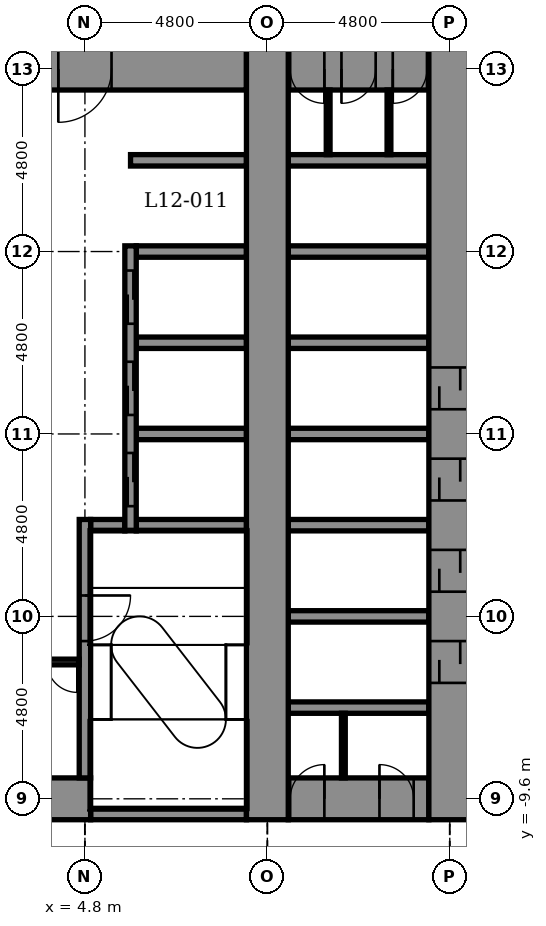
"""IFC4 building model, lengths in metres.
Left out: names, types, materials, properties, quantities, classifications, styles, units other than length and angle.
Written with IfcOpenShell. Run it as: python <this file> out.ifc"""

import sys

from ifc_helpers import new_model, si_unit, direction, frame, frame_2d, origin, place, context, subcontext, project, spatial, rectangle, extrude, element, fill, save


model = new_model("IFC4")
c1 = context("Model", 3, precision=1e-05, world=origin(), true_north=direction((0.0, 1.0)))
c2 = subcontext(c1, "Body", "Model", "MODEL_VIEW")
j1 = project(units=[si_unit("LENGTHUNIT", "METRE"), si_unit("PLANEANGLEUNIT", "RADIAN")], contexts=[c1])
p1 = place(None, origin())
s1 = spatial("IfcSite", under=j1, at=p1, CompositionType="ELEMENT")
p2 = place(p1, origin())
s2 = spatial("IfcBuilding", under=s1, at=p2, CompositionType="ELEMENT")
p3 = place(p2, frame((0.0, 0.0, 66.4)))
s3 = spatial("IfcBuildingStorey", under=s2, at=p3, CompositionType="ELEMENT", Elevation=66.4)
p4 = place(p3, frame((4.95, -10.0, -0.3), z_axis=(0.0, 0.0, 1.0), x_axis=(1.0, 0.0, 0.0)))
e1 = element("IfcWall", 1, at=p4, inside=s3, PredefinedType="STANDARD", context=c2, shape_type="SweptSolid", body=[
    extrude(rectangle(XDim=4.1, YDim=0.3, at=frame_2d((2.05, 0.0))), origin(), (0.0, 0.0, 1.0), 5.5),
])
p5 = place(p3, frame((-5.25, -9.6, -0.3), z_axis=(0.0, 0.0, 1.0), x_axis=(1.0, 0.0, 0.0)))
e2 = element("IfcWall", 2, at=p5, inside=s3, PredefinedType="SHEAR", context=c2, shape_type="SweptSolid", body=[
    extrude(rectangle(XDim=10.2, YDim=1.1, at=frame_2d((5.1, 0.0))), origin(), (0.0, 0.0, 1.0), 5.5),
])
p6 = place(p5, frame((0.6, 0.0, 0.3)))
e3 = element("IfcOpeningElement", 3, at=p6, cuts=e2, PredefinedType="OPENING", context=c2, shape_type="SweptSolid", body=[
    extrude(rectangle(XDim=0.9, YDim=2.1, at=frame_2d((0.45, 1.05))), frame((0.0, 0.56, 0.0), z_axis=(0.0, -1.0, 0.0), x_axis=(1.0, 0.0, 0.0)), (0.0, 0.0, 1.0), 1.12),
])
p7 = place(p3, frame((10.15, -9.6, -0.3), z_axis=(0.0, 0.0, 1.0), x_axis=(1.0, 0.0, 0.0)))
e4 = element("IfcWall", 4, at=p7, inside=s3, PredefinedType="SHEAR", context=c2, shape_type="SweptSolid", body=[
    extrude(rectangle(XDim=3.7, YDim=1.1, at=frame_2d((1.85, 0.0))), origin(), (0.0, 0.0, 1.0), 5.5),
])
p8 = place(p7, frame((0.05, 0.0, 0.3)))
e5 = element("IfcOpeningElement", 5, at=p8, cuts=e4, PredefinedType="OPENING", context=c2, shape_type="SweptSolid", body=[
    extrude(rectangle(XDim=0.9, YDim=2.1, at=frame_2d((0.45, 1.05))), frame((0.0, 0.56, 0.0), z_axis=(0.0, -1.0, 0.0), x_axis=(1.0, 0.0, 0.0)), (0.0, 0.0, 1.0), 1.12),
])
p9 = place(p7, frame((2.4, 0.0, 0.3)))
e6 = element("IfcOpeningElement", 6, at=p9, cuts=e4, PredefinedType="OPENING", context=c2, shape_type="SweptSolid", body=[
    extrude(rectangle(XDim=0.9, YDim=2.1, at=frame_2d((0.45, 1.05))), frame((0.0, 0.56, 0.0), z_axis=(0.0, -1.0, 0.0), x_axis=(1.0, 0.0, 0.0)), (0.0, 0.0, 1.0), 1.12),
])
for number, where, z_axis, x_axis in (
    (7, (10.15, -7.2, -0.3), (0.0, 0.0, 1.0), (1.0, 0.0, 0.0)),
    (8, (10.15, -4.8, -0.3), (0.0, 0.0, 1.0), (1.0, 0.0, 0.0)),
):
    element("IfcWall", number, at=place(p3, frame(where, z_axis=z_axis, x_axis=x_axis)), inside=s3, PredefinedType="STANDARD", context=c2, shape_type="SweptSolid", body=[
        extrude(rectangle(XDim=3.7, YDim=0.3, at=frame_2d((1.85, 0.0))), origin(), (0.0, 0.0, 1.0), 5.5),
    ])
p10 = place(p3, frame((4.95, -2.4, -0.3), z_axis=(0.0, 0.0, 1.0), x_axis=(1.0, 0.0, 0.0)))
e9 = element("IfcWall", 9, at=p10, inside=s3, PredefinedType="STANDARD", context=c2, shape_type="SweptSolid", body=[
    extrude(rectangle(XDim=0.9, YDim=0.3, at=frame_2d((0.45, 0.0))), origin(), (0.0, 0.0, 1.0), 5.5),
])
p11 = place(p3, frame((6.15, -2.4, -0.3), z_axis=(0.0, 0.0, 1.0), x_axis=(1.0, 0.0, 0.0)))
e10 = element("IfcWall", 10, at=p11, inside=s3, PredefinedType="STANDARD", context=c2, shape_type="SweptSolid", body=[
    extrude(rectangle(XDim=2.9, YDim=0.3, at=frame_2d((1.45, 0.0))), origin(), (0.0, 0.0, 1.0), 5.5),
])
p12 = place(p3, frame((10.15, -2.4, -0.3), z_axis=(0.0, 0.0, 1.0), x_axis=(1.0, 0.0, 0.0)))
e11 = element("IfcWall", 11, at=p12, inside=s3, PredefinedType="STANDARD", context=c2, shape_type="SweptSolid", body=[
    extrude(rectangle(XDim=3.7, YDim=0.3, at=frame_2d((1.85, 0.0))), origin(), (0.0, 0.0, 1.0), 5.5),
])
p13 = place(p3, frame((6.15, 0.0, -0.3), z_axis=(0.0, 0.0, 1.0), x_axis=(1.0, 0.0, 0.0)))
e12 = element("IfcWall", 12, at=p13, inside=s3, PredefinedType="STANDARD", context=c2, shape_type="SweptSolid", body=[
    extrude(rectangle(XDim=2.9, YDim=0.3, at=frame_2d((1.45, 0.0))), origin(), (0.0, 0.0, 1.0), 5.5),
])
p14 = place(p3, frame((10.15, 0.0, -0.3), z_axis=(0.0, 0.0, 1.0), x_axis=(1.0, 0.0, 0.0)))
e13 = element("IfcWall", 13, at=p14, inside=s3, PredefinedType="STANDARD", context=c2, shape_type="SweptSolid", body=[
    extrude(rectangle(XDim=3.7, YDim=0.3, at=frame_2d((1.85, 0.0))), origin(), (0.0, 0.0, 1.0), 5.5),
])
p15 = place(p3, frame((6.15, 2.4, -0.3), z_axis=(0.0, 0.0, 1.0), x_axis=(1.0, 0.0, 0.0)))
e14 = element("IfcWall", 14, at=p15, inside=s3, PredefinedType="STANDARD", context=c2, shape_type="SweptSolid", body=[
    extrude(rectangle(XDim=2.9, YDim=0.3, at=frame_2d((1.45, 0.0))), origin(), (0.0, 0.0, 1.0), 5.5),
])
p16 = place(p3, frame((10.15, 2.4, -0.3), z_axis=(0.0, 0.0, 1.0), x_axis=(1.0, 0.0, 0.0)))
e15 = element("IfcWall", 15, at=p16, inside=s3, PredefinedType="STANDARD", context=c2, shape_type="SweptSolid", body=[
    extrude(rectangle(XDim=3.7, YDim=0.3, at=frame_2d((1.85, 0.0))), origin(), (0.0, 0.0, 1.0), 5.5),
])
p17 = place(p3, frame((6.15, 4.8, -0.3), z_axis=(0.0, 0.0, 1.0), x_axis=(1.0, 0.0, 0.0)))
e16 = element("IfcWall", 16, at=p17, inside=s3, PredefinedType="STANDARD", context=c2, shape_type="SweptSolid", body=[
    extrude(rectangle(XDim=2.9, YDim=0.3, at=frame_2d((1.45, 0.0))), origin(), (0.0, 0.0, 1.0), 5.5),
])
p18 = place(p3, frame((10.15, 4.8, -0.3), z_axis=(0.0, 0.0, 1.0), x_axis=(1.0, 0.0, 0.0)))
e17 = element("IfcWall", 17, at=p18, inside=s3, PredefinedType="STANDARD", context=c2, shape_type="SweptSolid", body=[
    extrude(rectangle(XDim=3.7, YDim=0.3, at=frame_2d((1.85, 0.0))), origin(), (0.0, 0.0, 1.0), 5.5),
])
p19 = place(p3, frame((6.0, 7.2, -0.3), z_axis=(0.0, 0.0, 1.0), x_axis=(1.0, 0.0, 0.0)))
e18 = element("IfcWall", 18, at=p19, inside=s3, PredefinedType="STANDARD", context=c2, shape_type="SweptSolid", body=[
    extrude(rectangle(XDim=3.05, YDim=0.3, at=frame_2d((1.525, 0.0))), origin(), (0.0, 0.0, 1.0), 5.5),
])
p20 = place(p3, frame((10.15, 7.2, -0.3), z_axis=(0.0, 0.0, 1.0), x_axis=(1.0, 0.0, 0.0)))
e19 = element("IfcWall", 19, at=p20, inside=s3, PredefinedType="STANDARD", context=c2, shape_type="SweptSolid", body=[
    extrude(rectangle(XDim=3.7, YDim=0.3, at=frame_2d((1.85, 0.0))), origin(), (0.0, 0.0, 1.0), 5.5),
])
p21 = place(p3, frame((-5.25, 9.6, -0.3), z_axis=(0.0, 0.0, 1.0), x_axis=(1.0, 0.0, 0.0)))
e20 = element("IfcWall", 20, at=p21, inside=s3, PredefinedType="SHEAR", context=c2, shape_type="SweptSolid", body=[
    extrude(rectangle(XDim=14.3, YDim=1.1, at=frame_2d((7.15, 0.0))), origin(), (0.0, 0.0, 1.0), 5.5),
])
p22 = place(p21, frame((9.35, 0.0, 0.3)))
e21 = element("IfcOpeningElement", 21, at=p22, cuts=e20, PredefinedType="OPENING", context=c2, shape_type="SweptSolid", body=[
    extrude(rectangle(XDim=1.4, YDim=2.1, at=frame_2d((0.7, 1.05))), frame((0.0, 0.56, 0.0), z_axis=(0.0, -1.0, 0.0), x_axis=(1.0, 0.0, 0.0)), (0.0, 0.0, 1.0), 1.12),
])
p23 = place(p3, frame((10.15, 9.6, -0.3), z_axis=(0.0, 0.0, 1.0), x_axis=(1.0, 0.0, 0.0)))
e22 = element("IfcWall", 22, at=p23, inside=s3, PredefinedType="SHEAR", context=c2, shape_type="SweptSolid", body=[
    extrude(rectangle(XDim=3.7, YDim=1.1, at=frame_2d((1.85, 0.0))), origin(), (0.0, 0.0, 1.0), 5.5),
])
p24 = place(p23, frame((0.05, 0.0, 0.3)))
e23 = element("IfcOpeningElement", 23, at=p24, cuts=e22, PredefinedType="OPENING", context=c2, shape_type="SweptSolid", body=[
    extrude(rectangle(XDim=0.9, YDim=2.1, at=frame_2d((0.45, 1.05))), frame((0.0, 0.56, 0.0), z_axis=(0.0, -1.0, 0.0), x_axis=(1.0, 0.0, 0.0)), (0.0, 0.0, 1.0), 1.12),
])
p25 = place(p23, frame((1.4, 0.0, 0.3)))
e24 = element("IfcOpeningElement", 24, at=p25, cuts=e22, PredefinedType="OPENING", context=c2, shape_type="SweptSolid", body=[
    extrude(rectangle(XDim=0.9, YDim=2.1, at=frame_2d((0.45, 1.05))), frame((0.0, 0.56, 0.0), z_axis=(0.0, -1.0, 0.0), x_axis=(1.0, 0.0, 0.0)), (0.0, 0.0, 1.0), 1.12),
])
p26 = place(p23, frame((2.75, 0.0, 0.3)))
e25 = element("IfcOpeningElement", 25, at=p26, cuts=e22, PredefinedType="OPENING", context=c2, shape_type="SweptSolid", body=[
    extrude(rectangle(XDim=0.9, YDim=2.1, at=frame_2d((0.45, 1.05))), frame((0.0, 0.56, 0.0), z_axis=(0.0, -1.0, 0.0), x_axis=(1.0, 0.0, 0.0)), (0.0, 0.0, 1.0), 1.12),
])
p27 = place(p3, frame((4.8, -9.05, -0.3), z_axis=(0.0, 0.0, 1.0), x_axis=(0.0, 1.0, 0.0)))
e26 = element("IfcWall", 26, at=p27, inside=s3, PredefinedType="STANDARD", context=c2, shape_type="SweptSolid", body=[
    extrude(rectangle(XDim=6.8, YDim=0.3, at=frame_2d((3.4, 0.0))), origin(), (0.0, 0.0, 1.0), 5.5),
])
p28 = place(p27, frame((3.6, 0.0, 0.3)))
e27 = element("IfcOpeningElement", 27, at=p28, cuts=e26, PredefinedType="OPENING", context=c2, shape_type="SweptSolid", body=[
    extrude(rectangle(XDim=1.2, YDim=2.1, at=frame_2d((0.6, 1.05))), frame((0.0, 0.16, 0.0), z_axis=(0.0, -1.0, 0.0), x_axis=(1.0, 0.0, 0.0)), (0.0, 0.0, 1.0), 0.32),
])
p29 = place(p3, frame((6.0, -2.55, -0.3), z_axis=(0.0, 0.0, 1.0), x_axis=(0.0, 1.0, 0.0)))
e28 = element("IfcWall", 28, at=p29, inside=s3, PredefinedType="STANDARD", context=c2, shape_type="SweptSolid", body=[
    extrude(rectangle(XDim=7.5, YDim=0.3, at=frame_2d((3.75, 0.0))), origin(), (0.0, 0.0, 1.0), 5.5),
])
p30 = place(p29, frame((0.65, 0.0, 0.3)))
e29 = element("IfcOpeningElement", 29, at=p30, cuts=e28, PredefinedType="OPENING", context=c2, shape_type="SweptSolid", body=[
    extrude(rectangle(XDim=1.4, YDim=2.1, at=frame_2d((0.7, 1.05))), frame((0.0, 0.16, 0.0), z_axis=(0.0, -1.0, 0.0), x_axis=(1.0, 0.0, 0.0)), (0.0, 0.0, 1.0), 0.32),
])
p31 = place(p29, frame((3.05, 0.0, 0.3)))
e30 = element("IfcOpeningElement", 30, at=p31, cuts=e28, PredefinedType="OPENING", context=c2, shape_type="SweptSolid", body=[
    extrude(rectangle(XDim=1.4, YDim=2.1, at=frame_2d((0.7, 1.05))), frame((0.0, 0.16, 0.0), z_axis=(0.0, -1.0, 0.0), x_axis=(1.0, 0.0, 0.0)), (0.0, 0.0, 1.0), 0.32),
])
p32 = place(p29, frame((5.45, 0.0, 0.3)))
e31 = element("IfcOpeningElement", 31, at=p32, cuts=e28, PredefinedType="OPENING", context=c2, shape_type="SweptSolid", body=[
    extrude(rectangle(XDim=1.4, YDim=2.1, at=frame_2d((0.7, 1.05))), frame((0.0, 0.16, 0.0), z_axis=(0.0, -1.0, 0.0), x_axis=(1.0, 0.0, 0.0)), (0.0, 0.0, 1.0), 0.32),
])
p33 = place(p3, frame((9.6, -10.15, -0.3), z_axis=(0.0, 0.0, 1.0), x_axis=(0.0, 1.0, 0.0)))
e32 = element("IfcWall", 32, at=p33, inside=s3, PredefinedType="SHEAR", context=c2, shape_type="SweptSolid", body=[
    extrude(rectangle(XDim=20.3, YDim=1.1, at=frame_2d((10.15, 0.0))), origin(), (0.0, 0.0, 1.0), 5.5),
])
p34 = place(p3, frame((14.4, -10.15, -0.3), z_axis=(0.0, 0.0, 1.0), x_axis=(0.0, 1.0, 0.0)))
e33 = element("IfcWall", 33, at=p34, inside=s3, PredefinedType="SHEAR", context=c2, shape_type="SweptSolid", body=[
    extrude(rectangle(XDim=20.3, YDim=1.1, at=frame_2d((10.15, 0.0))), origin(), (0.0, 0.0, 1.0), 5.5),
])
p35 = place(p34, frame((3.6, 0.0, 0.3)))
e34 = element("IfcOpeningElement", 34, at=p35, cuts=e33, PredefinedType="OPENING", context=c2, shape_type="SweptSolid", body=[
    extrude(rectangle(XDim=1.1, YDim=2.1, at=frame_2d((0.55, 1.05))), frame((0.0, 0.56, 0.0), z_axis=(0.0, -1.0, 0.0), x_axis=(1.0, 0.0, 0.0)), (0.0, 0.0, 1.0), 1.12),
])
p36 = place(p34, frame((6.0, 0.0, 0.3)))
e35 = element("IfcOpeningElement", 35, at=p36, cuts=e33, PredefinedType="OPENING", context=c2, shape_type="SweptSolid", body=[
    extrude(rectangle(XDim=1.1, YDim=2.1, at=frame_2d((0.55, 1.05))), frame((0.0, 0.56, 0.0), z_axis=(0.0, -1.0, 0.0), x_axis=(1.0, 0.0, 0.0)), (0.0, 0.0, 1.0), 1.12),
])
p37 = place(p34, frame((8.4, 0.0, 0.3)))
e36 = element("IfcOpeningElement", 36, at=p37, cuts=e33, PredefinedType="OPENING", context=c2, shape_type="SweptSolid", body=[
    extrude(rectangle(XDim=1.1, YDim=2.1, at=frame_2d((0.55, 1.05))), frame((0.0, 0.56, 0.0), z_axis=(0.0, -1.0, 0.0), x_axis=(1.0, 0.0, 0.0)), (0.0, 0.0, 1.0), 1.12),
])
p38 = place(p34, frame((10.8, 0.0, 0.3)))
e37 = element("IfcOpeningElement", 37, at=p38, cuts=e33, PredefinedType="OPENING", context=c2, shape_type="SweptSolid", body=[
    extrude(rectangle(XDim=1.1, YDim=2.1, at=frame_2d((0.55, 1.05))), frame((0.0, 0.56, 0.0), z_axis=(0.0, -1.0, 0.0), x_axis=(1.0, 0.0, 0.0)), (0.0, 0.0, 1.0), 1.12),
])
for number, where, z_axis, x_axis in (
    (38, (12.8, 7.35, 0.0), (0.0, 0.0, 1.0), (0.0, 1.0, 0.0)),
    (39, (11.6, -9.05, 0.0), (0.0, 0.0, 1.0), (0.0, 1.0, 0.0)),
    (40, (11.2, 7.35, 0.0), (0.0, 0.0, 1.0), (0.0, 1.0, 0.0)),
):
    element("IfcWall", number, at=place(p3, frame(where, z_axis=z_axis, x_axis=x_axis)), inside=s3, PredefinedType="PARTITIONING", context=c2, shape_type="SweptSolid", body=[
        extrude(rectangle(XDim=1.7, YDim=0.1, at=frame_2d((0.85, 0.0))), origin(), (0.0, 0.0, 1.0), 5.2),
    ])
p39 = place(p3, frame((3.75, -6.0, 0.0), z_axis=(0.0, 0.0, 1.0), x_axis=(1.0, 0.0, 0.0)))
e41 = element("IfcWall", 41, at=p39, inside=s3, PredefinedType="PARTITIONING", context=c2, shape_type="SweptSolid", body=[
    extrude(rectangle(XDim=0.9, YDim=0.15, at=frame_2d((0.45, 0.0))), origin(), (0.0, 0.0, 1.0), 5.2),
])
p40 = place(p39, frame((0.05, 0.0, 0.0)))
e42 = element("IfcOpeningElement", 42, at=p40, cuts=e41, PredefinedType="OPENING", context=c2, shape_type="SweptSolid", body=[
    extrude(rectangle(XDim=0.8, YDim=2.1, at=frame_2d((0.4, 1.05))), frame((0.0, 0.085, 0.0), z_axis=(0.0, -1.0, 0.0), x_axis=(1.0, 0.0, 0.0)), (0.0, 0.0, 1.0), 0.17),
])
p41 = place(p40, frame((0.8, 0.0, 0.0), z_axis=(0.0, 0.0, 1.0), x_axis=(-1.0, 0.0, 0.0)))
e43 = element("IfcDoor", 43, at=p41, inside=s3, OperationType="SINGLE_SWING_RIGHT", PredefinedType="DOOR", context=c2, shape_type="SweptSolid", body=[
    extrude(rectangle(XDim=0.8, YDim=2.1, at=frame_2d((0.4, 1.05))), frame((0.0, 0.025, 0.0), z_axis=(0.0, -1.0, 0.0), x_axis=(1.0, 0.0, 0.0)), (0.0, 0.0, 1.0), 0.05),
])
fill(e42, e43)
p42 = place(p30, origin())
e44 = element("IfcDoor", 44, at=p42, inside=s3, OperationType="DOUBLE_DOOR_SLIDING", PredefinedType="DOOR", context=c2, shape_type="SweptSolid", body=[
    extrude(rectangle(XDim=1.4, YDim=2.1, at=frame_2d((0.7, 1.05))), frame((0.0, 0.025, 0.0), z_axis=(0.0, -1.0, 0.0), x_axis=(1.0, 0.0, 0.0)), (0.0, 0.0, 1.0), 0.05),
])
fill(e29, e44)
p43 = place(p31, origin())
e45 = element("IfcDoor", 45, at=p43, inside=s3, OperationType="DOUBLE_DOOR_SLIDING", PredefinedType="DOOR", context=c2, shape_type="SweptSolid", body=[
    extrude(rectangle(XDim=1.4, YDim=2.1, at=frame_2d((0.7, 1.05))), frame((0.0, 0.025, 0.0), z_axis=(0.0, -1.0, 0.0), x_axis=(1.0, 0.0, 0.0)), (0.0, 0.0, 1.0), 0.05),
])
fill(e30, e45)
p44 = place(p32, origin())
e46 = element("IfcDoor", 46, at=p44, inside=s3, OperationType="DOUBLE_DOOR_SLIDING", PredefinedType="DOOR", context=c2, shape_type="SweptSolid", body=[
    extrude(rectangle(XDim=1.4, YDim=2.1, at=frame_2d((0.7, 1.05))), frame((0.0, 0.025, 0.0), z_axis=(0.0, -1.0, 0.0), x_axis=(1.0, 0.0, 0.0)), (0.0, 0.0, 1.0), 0.05),
])
fill(e31, e46)
p45 = place(p35, origin())
e47 = element("IfcDoor", 47, at=p45, inside=s3, OperationType="DOUBLE_DOOR_SLIDING", PredefinedType="DOOR", context=c2, shape_type="SweptSolid", body=[
    extrude(rectangle(XDim=1.1, YDim=2.1, at=frame_2d((0.55, 1.05))), frame((0.0, 0.025, 0.0), z_axis=(0.0, -1.0, 0.0), x_axis=(1.0, 0.0, 0.0)), (0.0, 0.0, 1.0), 0.05),
])
fill(e34, e47)
p46 = place(p36, origin())
e48 = element("IfcDoor", 48, at=p46, inside=s3, OperationType="DOUBLE_DOOR_SLIDING", PredefinedType="DOOR", context=c2, shape_type="SweptSolid", body=[
    extrude(rectangle(XDim=1.1, YDim=2.1, at=frame_2d((0.55, 1.05))), frame((0.0, 0.025, 0.0), z_axis=(0.0, -1.0, 0.0), x_axis=(1.0, 0.0, 0.0)), (0.0, 0.0, 1.0), 0.05),
])
fill(e35, e48)
p47 = place(p37, origin())
e49 = element("IfcDoor", 49, at=p47, inside=s3, OperationType="DOUBLE_DOOR_SLIDING", PredefinedType="DOOR", context=c2, shape_type="SweptSolid", body=[
    extrude(rectangle(XDim=1.1, YDim=2.1, at=frame_2d((0.55, 1.05))), frame((0.0, 0.025, 0.0), z_axis=(0.0, -1.0, 0.0), x_axis=(1.0, 0.0, 0.0)), (0.0, 0.0, 1.0), 0.05),
])
fill(e36, e49)
p48 = place(p38, origin())
e50 = element("IfcDoor", 50, at=p48, inside=s3, OperationType="DOUBLE_DOOR_SLIDING", PredefinedType="DOOR", context=c2, shape_type="SweptSolid", body=[
    extrude(rectangle(XDim=1.1, YDim=2.1, at=frame_2d((0.55, 1.05))), frame((0.0, 0.025, 0.0), z_axis=(0.0, -1.0, 0.0), x_axis=(1.0, 0.0, 0.0)), (0.0, 0.0, 1.0), 0.05),
])
fill(e37, e50)
p49 = place(p28, frame((1.2, 0.0, 0.0), z_axis=(0.0, 0.0, 1.0), x_axis=(-1.0, 0.0, 0.0)))
e51 = element("IfcDoor", 51, at=p49, inside=s3, OperationType="SINGLE_SWING_RIGHT", PredefinedType="DOOR", context=c2, shape_type="SweptSolid", body=[
    extrude(rectangle(XDim=1.2, YDim=2.1, at=frame_2d((0.6, 1.05))), frame((0.0, 0.025, 0.0), z_axis=(0.0, -1.0, 0.0), x_axis=(1.0, 0.0, 0.0)), (0.0, 0.0, 1.0), 0.05),
])
fill(e27, e51)
p50 = place(p8, origin())
e52 = element("IfcDoor", 52, at=p50, inside=s3, OperationType="SINGLE_SWING_RIGHT", PredefinedType="DOOR", context=c2, shape_type="SweptSolid", body=[
    extrude(rectangle(XDim=0.9, YDim=2.1, at=frame_2d((0.45, 1.05))), frame((0.0, 0.025, 0.0), z_axis=(0.0, -1.0, 0.0), x_axis=(1.0, 0.0, 0.0)), (0.0, 0.0, 1.0), 0.05),
])
fill(e5, e52)
p51 = place(p9, origin())
e53 = element("IfcDoor", 53, at=p51, inside=s3, OperationType="SINGLE_SWING_LEFT", PredefinedType="DOOR", context=c2, shape_type="SweptSolid", body=[
    extrude(rectangle(XDim=0.9, YDim=2.1, at=frame_2d((0.45, 1.05))), frame((0.0, 0.025, 0.0), z_axis=(0.0, -1.0, 0.0), x_axis=(1.0, 0.0, 0.0)), (0.0, 0.0, 1.0), 0.05),
])
fill(e6, e53)
p52 = place(p24, frame((0.9, 0.0, 0.0), z_axis=(0.0, 0.0, 1.0), x_axis=(-1.0, 0.0, 0.0)))
e54 = element("IfcDoor", 54, at=p52, inside=s3, OperationType="SINGLE_SWING_RIGHT", PredefinedType="DOOR", context=c2, shape_type="SweptSolid", body=[
    extrude(rectangle(XDim=0.9, YDim=2.1, at=frame_2d((0.45, 1.05))), frame((0.0, 0.025, 0.0), z_axis=(0.0, -1.0, 0.0), x_axis=(1.0, 0.0, 0.0)), (0.0, 0.0, 1.0), 0.05),
])
fill(e23, e54)
p53 = place(p25, frame((0.9, 0.0, 0.0), z_axis=(0.0, 0.0, 1.0), x_axis=(-1.0, 0.0, 0.0)))
e55 = element("IfcDoor", 55, at=p53, inside=s3, OperationType="SINGLE_SWING_LEFT", PredefinedType="DOOR", context=c2, shape_type="SweptSolid", body=[
    extrude(rectangle(XDim=0.9, YDim=2.1, at=frame_2d((0.45, 1.05))), frame((0.0, 0.025, 0.0), z_axis=(0.0, -1.0, 0.0), x_axis=(1.0, 0.0, 0.0)), (0.0, 0.0, 1.0), 0.05),
])
fill(e24, e55)
p54 = place(p26, frame((0.9, 0.0, 0.0), z_axis=(0.0, 0.0, 1.0), x_axis=(-1.0, 0.0, 0.0)))
e56 = element("IfcDoor", 56, at=p54, inside=s3, OperationType="SINGLE_SWING_LEFT", PredefinedType="DOOR", context=c2, shape_type="SweptSolid", body=[
    extrude(rectangle(XDim=0.9, YDim=2.1, at=frame_2d((0.45, 1.05))), frame((0.0, 0.025, 0.0), z_axis=(0.0, -1.0, 0.0), x_axis=(1.0, 0.0, 0.0)), (0.0, 0.0, 1.0), 0.05),
])
fill(e25, e56)
p55 = place(p22, frame((1.4, 0.0, 0.0), z_axis=(0.0, 0.0, 1.0), x_axis=(-1.0, 0.0, 0.0)))
e57 = element("IfcDoor", 57, at=p55, inside=s3, OperationType="SINGLE_SWING_LEFT", PredefinedType="DOOR", context=c2, shape_type="SweptSolid", body=[
    extrude(rectangle(XDim=1.4, YDim=2.1, at=frame_2d((0.7, 1.05))), frame((0.0, 0.025, 0.0), z_axis=(0.0, -1.0, 0.0), x_axis=(1.0, 0.0, 0.0)), (0.0, 0.0, 1.0), 0.05),
])
fill(e21, e57)
save(model, sys.argv[1])
